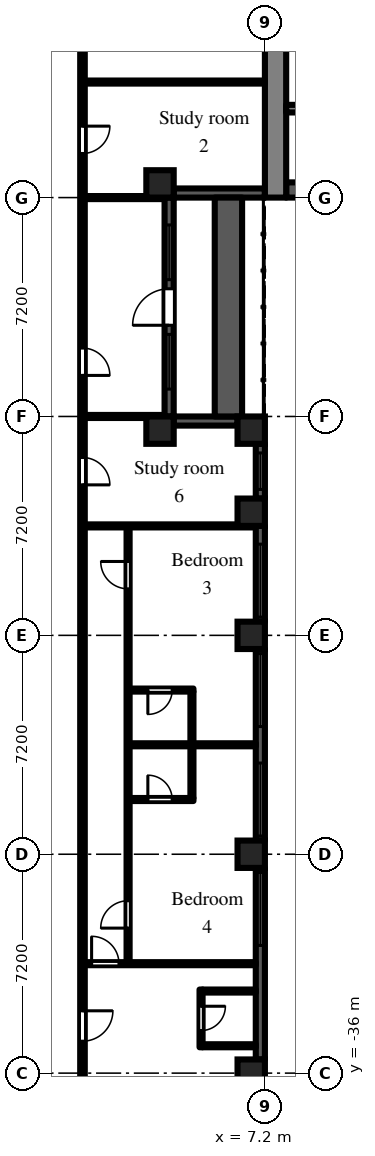
"""IFC4 building model, lengths in metres.
Left out: names, types, materials, properties, quantities, classifications, styles, units other than length and angle.
Written with IfcOpenShell. Run it as: python <this file> out.ifc"""

import sys

from ifc_helpers import new_model, si_unit, direction, frame, frame_2d, origin, origin_2d, place, context, subcontext, project, spatial, rectangle, extrude, element, fill, save


model = new_model("IFC4")
c1 = context("Model", 3, precision=1e-05, world=origin(), true_north=direction((0.0, 1.0)))
c2 = subcontext(c1, "Body", "Model", "MODEL_VIEW")
j1 = project(units=[si_unit("LENGTHUNIT", "METRE"), si_unit("PLANEANGLEUNIT", "RADIAN")], contexts=[c1])
p1 = place(None, origin())
s1 = spatial("IfcSite", under=j1, at=p1, CompositionType="ELEMENT")
p2 = place(p1, origin())
s2 = spatial("IfcBuilding", under=s1, at=p2, CompositionType="ELEMENT")
p3 = place(p2, frame((0.0, 0.0, 44.7)))
s3 = spatial("IfcBuildingStorey", under=s2, at=p3, CompositionType="ELEMENT", Elevation=44.7)
for number, where, z_axis, x_axis in (
    (1, (3.75, -14.85, 0.0), (0.0, 0.0, 1.0), (1.0, 0.0, 0.0)),
    (2, (3.75, -6.75, 0.0), (0.0, 0.0, 1.0), (1.0, 0.0, 0.0)),
    (3, (6.75, -36.0, 0.0), (0.0, 0.0, 1.0), (1.0, 0.0, 0.0)),
    (4, (6.75, -28.8, 0.0), (0.0, 0.0, 1.0), (1.0, 0.0, 0.0)),
    (5, (6.75, -21.6, 0.0), (0.0, 0.0, 1.0), (1.0, 0.0, 0.0)),
    (6, (6.75, -17.55, 0.0), (0.0, 0.0, 1.0), (1.0, 0.0, 0.0)),
    (7, (6.75, -14.85, 0.0), (0.0, 0.0, 1.0), (1.0, 0.0, 0.0)),
):
    element("IfcColumn", number, at=place(p3, frame(where, z_axis=z_axis, x_axis=x_axis)), inside=s3, PredefinedType="COLUMN", context=c2, shape_type="SweptSolid", body=[
        extrude(rectangle(XDim=0.9, YDim=0.9, at=origin_2d()), origin(), (0.0, 0.0, 1.0), 3.0),
    ])
p4 = place(p3, frame((7.05, -35.55, 0.0), z_axis=(0.0, 0.0, 1.0), x_axis=(0.0, 1.0, 0.0)))
e8 = element("IfcWall", 8, at=p4, inside=s3, PredefinedType="SOLIDWALL", context=c2, shape_type="SweptSolid", body=[
    extrude(rectangle(XDim=6.3, YDim=0.3, at=frame_2d((3.15, 0.0))), origin(), (0.0, 0.0, 1.0), 2.1),
])
p5 = place(p4, frame((3.75, 0.0, 0.2)))
e9 = element("IfcOpeningElement", 9, at=p5, cuts=e8, PredefinedType="OPENING", context=c2, shape_type="SweptSolid", body=[
    extrude(rectangle(XDim=2.4, YDim=1.85, at=frame_2d((1.2, 0.925))), frame((0.0, 0.16, 0.0), z_axis=(0.0, -1.0, 0.0), x_axis=(1.0, 0.0, 0.0)), (0.0, 0.0, 1.0), 0.32),
])
p6 = place(p3, frame((7.05, -28.35, 0.0), z_axis=(0.0, 0.0, 1.0), x_axis=(0.0, 1.0, 0.0)))
e10 = element("IfcWall", 10, at=p6, inside=s3, PredefinedType="SOLIDWALL", context=c2, shape_type="SweptSolid", body=[
    extrude(rectangle(XDim=6.3, YDim=0.3, at=frame_2d((3.15, 0.0))), origin(), (0.0, 0.0, 1.0), 2.1),
])
p7 = place(p6, frame((0.15, 0.0, 0.2)))
e11 = element("IfcOpeningElement", 11, at=p7, cuts=e10, PredefinedType="OPENING", context=c2, shape_type="SweptSolid", body=[
    extrude(rectangle(XDim=2.4, YDim=1.85, at=frame_2d((1.2, 0.925))), frame((0.0, 0.16, 0.0), z_axis=(0.0, -1.0, 0.0), x_axis=(1.0, 0.0, 0.0)), (0.0, 0.0, 1.0), 0.32),
])
p8 = place(p6, frame((3.75, 0.0, 0.2)))
e12 = element("IfcOpeningElement", 12, at=p8, cuts=e10, PredefinedType="OPENING", context=c2, shape_type="SweptSolid", body=[
    extrude(rectangle(XDim=2.4, YDim=1.85, at=frame_2d((1.2, 0.925))), frame((0.0, 0.16, 0.0), z_axis=(0.0, -1.0, 0.0), x_axis=(1.0, 0.0, 0.0)), (0.0, 0.0, 1.0), 0.32),
])
p9 = place(p3, frame((7.05, -21.15, 0.0), z_axis=(0.0, 0.0, 1.0), x_axis=(0.0, 1.0, 0.0)))
e13 = element("IfcWall", 13, at=p9, inside=s3, PredefinedType="SOLIDWALL", context=c2, shape_type="SweptSolid", body=[
    extrude(rectangle(XDim=3.15, YDim=0.3, at=frame_2d((1.575, 0.0))), origin(), (0.0, 0.0, 1.0), 2.1),
])
p10 = place(p9, frame((0.15, 0.0, 0.2)))
e14 = element("IfcOpeningElement", 14, at=p10, cuts=e13, PredefinedType="OPENING", context=c2, shape_type="SweptSolid", body=[
    extrude(rectangle(XDim=2.4, YDim=1.85, at=frame_2d((1.2, 0.925))), frame((0.0, 0.16, 0.0), z_axis=(0.0, -1.0, 0.0), x_axis=(1.0, 0.0, 0.0)), (0.0, 0.0, 1.0), 0.32),
])
p11 = place(p3, frame((7.05, -17.1, 0.0), z_axis=(0.0, 0.0, 1.0), x_axis=(0.0, 1.0, 0.0)))
e15 = element("IfcWall", 15, at=p11, inside=s3, PredefinedType="SOLIDWALL", context=c2, shape_type="SweptSolid", body=[
    extrude(rectangle(XDim=1.8, YDim=0.3, at=frame_2d((0.9, 0.0))), origin(), (0.0, 0.0, 1.0), 2.1),
])
p12 = place(p11, frame((0.3, 0.0, 0.2)))
e16 = element("IfcOpeningElement", 16, at=p12, cuts=e15, PredefinedType="OPENING", context=c2, shape_type="SweptSolid", body=[
    extrude(rectangle(XDim=1.2, YDim=1.85, at=frame_2d((0.6, 0.925))), frame((0.0, 0.16, 0.0), z_axis=(0.0, -1.0, 0.0), x_axis=(1.0, 0.0, 0.0)), (0.0, 0.0, 1.0), 0.32),
])
p13 = place(p3, frame((6.3, -14.55, 0.0), z_axis=(0.0, 0.0, 1.0), x_axis=(-1.0, 0.0, 0.0)))
e17 = element("IfcWall", 17, at=p13, inside=s3, PredefinedType="SOLIDWALL", context=c2, shape_type="SweptSolid", body=[
    extrude(rectangle(XDim=2.1, YDim=0.3, at=frame_2d((1.05, 0.0))), origin(), (0.0, 0.0, 1.0), 2.1),
])
p14 = place(p3, frame((4.05, -14.4, 0.0), z_axis=(0.0, 0.0, 1.0), x_axis=(0.0, 1.0, 0.0)))
e18 = element("IfcWall", 18, at=p14, inside=s3, PredefinedType="SOLIDWALL", context=c2, shape_type="SweptSolid", body=[
    extrude(rectangle(XDim=7.2, YDim=0.3, at=frame_2d((3.6, 0.0))), origin(), (0.0, 0.0, 1.0), 2.1),
])
p15 = place(p14, frame((3.0, 0.0, 0.0)))
e19 = element("IfcOpeningElement", 19, at=p15, cuts=e18, PredefinedType="OPENING", context=c2, shape_type="SweptSolid", body=[
    extrude(rectangle(XDim=1.2, YDim=2.05, at=frame_2d((0.6, 1.025))), frame((0.0, 0.16, 0.0), z_axis=(0.0, -1.0, 0.0), x_axis=(1.0, 0.0, 0.0)), (0.0, 0.0, 1.0), 0.32),
])
p16 = place(p14, frame((0.9, 0.0, 0.2)))
e20 = element("IfcOpeningElement", 20, at=p16, cuts=e18, PredefinedType="OPENING", context=c2, shape_type="SweptSolid", body=[
    extrude(rectangle(XDim=1.8, YDim=1.85, at=frame_2d((0.9, 0.925))), frame((0.0, 0.16, 0.0), z_axis=(0.0, -1.0, 0.0), x_axis=(1.0, 0.0, 0.0)), (0.0, 0.0, 1.0), 0.32),
])
p17 = place(p14, frame((4.5, 0.0, 0.2)))
e21 = element("IfcOpeningElement", 21, at=p17, cuts=e18, PredefinedType="OPENING", context=c2, shape_type="SweptSolid", body=[
    extrude(rectangle(XDim=1.8, YDim=1.85, at=frame_2d((0.9, 0.925))), frame((0.0, 0.16, 0.0), z_axis=(0.0, -1.0, 0.0), x_axis=(1.0, 0.0, 0.0)), (0.0, 0.0, 1.0), 0.32),
])
p18 = place(p3, frame((4.2, -7.05, 0.0), z_axis=(0.0, 0.0, 1.0), x_axis=(1.0, 0.0, 0.0)))
e22 = element("IfcWall", 22, at=p18, inside=s3, PredefinedType="SOLIDWALL", context=c2, shape_type="SweptSolid", body=[
    extrude(rectangle(XDim=3.0, YDim=0.3, at=frame_2d((1.5, 0.0))), origin(), (0.0, 0.0, 1.0), 2.1),
])
p19 = place(p3, frame((6.0, -14.4, 0.0), z_axis=(0.0, 0.0, 1.0), x_axis=(0.0, 1.0, 0.0)))
e23 = element("IfcWall", 23, at=p19, inside=s3, PredefinedType="PARAPET", context=c2, shape_type="SweptSolid", body=[
    extrude(rectangle(XDim=7.2, YDim=0.9, at=frame_2d((3.6, 0.0))), origin(), (0.0, 0.0, 1.0), 0.8),
])
p20 = place(p3, frame((7.55, -7.2, 0.0), z_axis=(0.0, 0.0, 1.0), x_axis=(0.0, 1.0, 0.0)))
e24 = element("IfcWall", 24, at=p20, inside=s3, PredefinedType="SHEAR", context=c2, shape_type="SweptSolid", body=[
    extrude(rectangle(XDim=14.4, YDim=0.7, at=frame_2d((7.2, 0.0))), origin(), (0.0, 0.0, 1.0), 2.575),
])
p21 = place(p20, frame((6.0, 0.0, 0.0)))
e25 = element("IfcOpeningElement", 25, at=p21, cuts=e24, PredefinedType="OPENING", context=c2, shape_type="SweptSolid", body=[
    extrude(rectangle(XDim=2.4, YDim=2.2, at=frame_2d((1.2, 1.1))), frame((0.0, 0.36, 0.0), z_axis=(0.0, -1.0, 0.0), x_axis=(1.0, 0.0, 0.0)), (0.0, 0.0, 1.0), 0.72),
])
p22 = place(p3, frame((7.9, -6.95, 0.0), z_axis=(0.0, 0.0, 1.0), x_axis=(1.0, 0.0, 0.0)))
e26 = element("IfcWall", 26, at=p22, inside=s3, PredefinedType="SHEAR", context=c2, shape_type="SweptSolid", body=[
    extrude(rectangle(XDim=12.95, YDim=0.5, at=frame_2d((6.475, 0.0))), origin(), (0.0, 0.0, 1.0), 2.575),
])
p23 = place(p3, frame((7.9, -4.275, 0.0), z_axis=(0.0, 0.0, 1.0), x_axis=(1.0, 0.0, 0.0)))
e27 = element("IfcWall", 27, at=p23, inside=s3, PredefinedType="SHEAR", context=c2, shape_type="SweptSolid", body=[
    extrude(rectangle(XDim=1.95, YDim=0.25, at=frame_2d((0.975, 0.0))), origin(), (0.0, 0.0, 1.0), 2.575),
])
p24 = place(p3, frame((1.2, -36.5, 0.0), z_axis=(0.0, 0.0, 1.0), x_axis=(0.0, 1.0, 0.0)))
e28 = element("IfcWall", 28, at=p24, inside=s3, PredefinedType="PARTITIONING", context=c2, shape_type="SweptSolid", body=[
    extrude(rectangle(XDim=35.375, YDim=0.15, at=frame_2d((17.688, 0.0))), origin(), (0.0, 0.0, 1.0), 2.575),
])
p25 = place(p24, frame((30.75, 0.0, 0.0)))
e29 = element("IfcOpeningElement", 29, at=p25, cuts=e28, PredefinedType="OPENING", context=c2, shape_type="SweptSolid", body=[
    extrude(rectangle(XDim=0.9, YDim=2.1, at=frame_2d((0.45, 1.05))), frame((0.0, 0.085, 0.0), z_axis=(0.0, -1.0, 0.0), x_axis=(1.0, 0.0, 0.0)), (0.0, 0.0, 1.0), 0.17),
])
p26 = place(p24, frame((23.45, 0.0, 0.0)))
e30 = element("IfcOpeningElement", 30, at=p26, cuts=e28, PredefinedType="OPENING", context=c2, shape_type="SweptSolid", body=[
    extrude(rectangle(XDim=0.9, YDim=2.1, at=frame_2d((0.45, 1.05))), frame((0.0, 0.085, 0.0), z_axis=(0.0, -1.0, 0.0), x_axis=(1.0, 0.0, 0.0)), (0.0, 0.0, 1.0), 0.17),
])
p27 = place(p24, frame((19.85, 0.0, 0.0)))
e31 = element("IfcOpeningElement", 31, at=p27, cuts=e28, PredefinedType="OPENING", context=c2, shape_type="SweptSolid", body=[
    extrude(rectangle(XDim=0.9, YDim=2.1, at=frame_2d((0.45, 1.05))), frame((0.0, 0.085, 0.0), z_axis=(0.0, -1.0, 0.0), x_axis=(1.0, 0.0, 0.0)), (0.0, 0.0, 1.0), 0.17),
])
p28 = place(p24, frame((1.55, 0.0, 0.0)))
e32 = element("IfcOpeningElement", 32, at=p28, cuts=e28, PredefinedType="OPENING", context=c2, shape_type="SweptSolid", body=[
    extrude(rectangle(XDim=1.0, YDim=2.1, at=frame_2d((0.5, 1.05))), frame((0.0, 0.085, 0.0), z_axis=(0.0, -1.0, 0.0), x_axis=(1.0, 0.0, 0.0)), (0.0, 0.0, 1.0), 0.17),
])
p29 = place(p3, frame((1.275, -32.4, 0.0), z_axis=(0.0, 0.0, 1.0), x_axis=(1.0, 0.0, 0.0)))
e33 = element("IfcWall", 33, at=p29, inside=s3, PredefinedType="PARTITIONING", context=c2, shape_type="SweptSolid", body=[
    extrude(rectangle(XDim=5.625, YDim=0.1, at=frame_2d((2.812, 0.0))), origin(), (0.0, 0.0, 1.0), 2.575),
])
p30 = place(p29, frame((0.225, 0.0, 0.0)))
e34 = element("IfcOpeningElement", 34, at=p30, cuts=e33, PredefinedType="OPENING", context=c2, shape_type="SweptSolid", body=[
    extrude(rectangle(XDim=0.9, YDim=2.1, at=frame_2d((0.45, 1.05))), frame((0.0, 0.06, 0.0), z_axis=(0.0, -1.0, 0.0), x_axis=(1.0, 0.0, 0.0)), (0.0, 0.0, 1.0), 0.12),
])
p31 = place(p3, frame((1.275, -18.0, 0.0), z_axis=(0.0, 0.0, 1.0), x_axis=(1.0, 0.0, 0.0)))
e35 = element("IfcWall", 35, at=p31, inside=s3, PredefinedType="PARTITIONING", context=c2, shape_type="SweptSolid", body=[
    extrude(rectangle(XDim=5.625, YDim=0.1, at=frame_2d((2.812, 0.0))), origin(), (0.0, 0.0, 1.0), 2.575),
])
for number, where, z_axis, x_axis in (
    (36, (1.275, -14.4, 0.0), (0.0, 0.0, 1.0), (1.0, 0.0, 0.0)),
    (37, (1.275, -7.2, 0.0), (0.0, 0.0, 1.0), (1.0, 0.0, 0.0)),
):
    element("IfcWall", number, at=place(p3, frame(where, z_axis=z_axis, x_axis=x_axis)), inside=s3, PredefinedType="PARTITIONING", context=c2, shape_type="SweptSolid", body=[
        extrude(rectangle(XDim=2.625, YDim=0.1, at=frame_2d((1.312, 0.0))), origin(), (0.0, 0.0, 1.0), 2.575),
    ])
p32 = place(p3, frame((1.275, -3.4, 0.0), z_axis=(0.0, 0.0, 1.0), x_axis=(1.0, 0.0, 0.0)))
e38 = element("IfcWall", 38, at=p32, inside=s3, PredefinedType="PARTITIONING", context=c2, shape_type="SweptSolid", body=[
    extrude(rectangle(XDim=5.925, YDim=0.1, at=frame_2d((2.962, 0.0))), origin(), (0.0, 0.0, 1.0), 2.575),
])
p33 = place(p3, frame((2.7, -32.35, 0.0), z_axis=(0.0, 0.0, 1.0), x_axis=(0.0, 1.0, 0.0)))
e39 = element("IfcWall", 39, at=p33, inside=s3, PredefinedType="PARTITIONING", context=c2, shape_type="SweptSolid", body=[
    extrude(rectangle(XDim=14.3, YDim=0.1, at=frame_2d((7.15, 0.0))), origin(), (0.0, 0.0, 1.0), 2.575),
])
p34 = place(p33, frame((1.12, 0.0, 0.0)))
e40 = element("IfcOpeningElement", 40, at=p34, cuts=e39, PredefinedType="OPENING", context=c2, shape_type="SweptSolid", body=[
    extrude(rectangle(XDim=0.9, YDim=2.1, at=frame_2d((0.45, 1.05))), frame((0.0, 0.06, 0.0), z_axis=(0.0, -1.0, 0.0), x_axis=(1.0, 0.0, 0.0)), (0.0, 0.0, 1.0), 0.12),
])
p35 = place(p33, frame((12.28, 0.0, 0.0)))
e41 = element("IfcOpeningElement", 41, at=p35, cuts=e39, PredefinedType="OPENING", context=c2, shape_type="SweptSolid", body=[
    extrude(rectangle(XDim=0.9, YDim=2.1, at=frame_2d((0.45, 1.05))), frame((0.0, 0.06, 0.0), z_axis=(0.0, -1.0, 0.0), x_axis=(1.0, 0.0, 0.0)), (0.0, 0.0, 1.0), 0.12),
])
p36 = place(p3, frame((2.75, -27.0, 0.0), z_axis=(0.0, 0.0, 1.0), x_axis=(1.0, 0.0, 0.0)))
e42 = element("IfcWall", 42, at=p36, inside=s3, PredefinedType="PARTITIONING", context=c2, shape_type="SweptSolid", body=[
    extrude(rectangle(XDim=2.1, YDim=0.1, at=frame_2d((1.05, 0.0))), origin(), (0.0, 0.0, 1.0), 2.575),
])
p37 = place(p36, frame((0.6, 0.0, 0.0)))
e43 = element("IfcOpeningElement", 43, at=p37, cuts=e42, PredefinedType="OPENING", context=c2, shape_type="SweptSolid", body=[
    extrude(rectangle(XDim=0.8, YDim=2.1, at=frame_2d((0.4, 1.05))), frame((0.0, 0.06, 0.0), z_axis=(0.0, -1.0, 0.0), x_axis=(1.0, 0.0, 0.0)), (0.0, 0.0, 1.0), 0.12),
])
p38 = place(p3, frame((2.75, -25.2, 0.0), z_axis=(0.0, 0.0, 1.0), x_axis=(1.0, 0.0, 0.0)))
e44 = element("IfcWall", 44, at=p38, inside=s3, PredefinedType="PARTITIONING", context=c2, shape_type="SweptSolid", body=[
    extrude(rectangle(XDim=4.15, YDim=0.1, at=frame_2d((2.075, 0.0))), origin(), (0.0, 0.0, 1.0), 2.575),
])
p39 = place(p3, frame((2.75, -23.4, 0.0), z_axis=(0.0, 0.0, 1.0), x_axis=(1.0, 0.0, 0.0)))
e45 = element("IfcWall", 45, at=p39, inside=s3, PredefinedType="PARTITIONING", context=c2, shape_type="SweptSolid", body=[
    extrude(rectangle(XDim=2.1, YDim=0.1, at=frame_2d((1.05, 0.0))), origin(), (0.0, 0.0, 1.0), 2.575),
])
p40 = place(p39, frame((0.6, 0.0, 0.0)))
e46 = element("IfcOpeningElement", 46, at=p40, cuts=e45, PredefinedType="OPENING", context=c2, shape_type="SweptSolid", body=[
    extrude(rectangle(XDim=0.8, YDim=2.1, at=frame_2d((0.4, 1.05))), frame((0.0, 0.06, 0.0), z_axis=(0.0, -1.0, 0.0), x_axis=(1.0, 0.0, 0.0)), (0.0, 0.0, 1.0), 0.12),
])
p41 = place(p3, frame((4.8, -26.95, 0.0), z_axis=(0.0, 0.0, 1.0), x_axis=(0.0, 1.0, 0.0)))
e47 = element("IfcWall", 47, at=p41, inside=s3, PredefinedType="PARTITIONING", context=c2, shape_type="SweptSolid", body=[
    extrude(rectangle(XDim=3.5, YDim=0.1, at=frame_2d((1.75, 0.0))), origin(), (0.0, 0.0, 1.0), 2.575),
])
p42 = place(p3, frame((5.1, -35.15, 0.0), z_axis=(0.0, 0.0, 1.0), x_axis=(0.0, 1.0, 0.0)))
e48 = element("IfcWall", 48, at=p42, inside=s3, PredefinedType="PARTITIONING", context=c2, shape_type="SweptSolid", body=[
    extrude(rectangle(XDim=1.9, YDim=0.1, at=frame_2d((0.95, 0.0))), origin(), (0.0, 0.0, 1.0), 2.575),
])
p43 = place(p42, frame((0.55, 0.0, 0.0)))
e49 = element("IfcOpeningElement", 49, at=p43, cuts=e48, PredefinedType="OPENING", context=c2, shape_type="SweptSolid", body=[
    extrude(rectangle(XDim=0.8, YDim=2.1, at=frame_2d((0.4, 1.05))), frame((0.0, 0.06, 0.0), z_axis=(0.0, -1.0, 0.0), x_axis=(1.0, 0.0, 0.0)), (0.0, 0.0, 1.0), 0.12),
])
for number, where, z_axis, x_axis in (
    (50, (5.15, -35.1, 0.0), (0.0, 0.0, 1.0), (1.0, 0.0, 0.0)),
    (51, (5.15, -33.3, 0.0), (0.0, 0.0, 1.0), (1.0, 0.0, 0.0)),
):
    element("IfcWall", number, at=place(p3, frame(where, z_axis=z_axis, x_axis=x_axis)), inside=s3, PredefinedType="PARTITIONING", context=c2, shape_type="SweptSolid", body=[
        extrude(rectangle(XDim=1.75, YDim=0.1, at=frame_2d((0.875, 0.0))), origin(), (0.0, 0.0, 1.0), 2.575),
    ])
p44 = place(p5, origin())
e52 = element("IfcWindow", 52, at=p44, inside=s3, PartitioningType="SINGLE_PANEL", PredefinedType="WINDOW", context=c2, shape_type="SweptSolid", body=[
    extrude(rectangle(XDim=2.4, YDim=1.85, at=frame_2d((1.2, 0.925))), frame((0.0, 0.03, 0.0), z_axis=(0.0, -1.0, 0.0), x_axis=(1.0, 0.0, 0.0)), (0.0, 0.0, 1.0), 0.06),
])
fill(e9, e52)
p45 = place(p7, origin())
e53 = element("IfcWindow", 53, at=p45, inside=s3, PartitioningType="SINGLE_PANEL", PredefinedType="WINDOW", context=c2, shape_type="SweptSolid", body=[
    extrude(rectangle(XDim=2.4, YDim=1.85, at=frame_2d((1.2, 0.925))), frame((0.0, 0.03, 0.0), z_axis=(0.0, -1.0, 0.0), x_axis=(1.0, 0.0, 0.0)), (0.0, 0.0, 1.0), 0.06),
])
fill(e11, e53)
p46 = place(p8, origin())
e54 = element("IfcWindow", 54, at=p46, inside=s3, PartitioningType="SINGLE_PANEL", PredefinedType="WINDOW", context=c2, shape_type="SweptSolid", body=[
    extrude(rectangle(XDim=2.4, YDim=1.85, at=frame_2d((1.2, 0.925))), frame((0.0, 0.03, 0.0), z_axis=(0.0, -1.0, 0.0), x_axis=(1.0, 0.0, 0.0)), (0.0, 0.0, 1.0), 0.06),
])
fill(e12, e54)
p47 = place(p10, origin())
e55 = element("IfcWindow", 55, at=p47, inside=s3, PartitioningType="SINGLE_PANEL", PredefinedType="WINDOW", context=c2, shape_type="SweptSolid", body=[
    extrude(rectangle(XDim=2.4, YDim=1.85, at=frame_2d((1.2, 0.925))), frame((0.0, 0.03, 0.0), z_axis=(0.0, -1.0, 0.0), x_axis=(1.0, 0.0, 0.0)), (0.0, 0.0, 1.0), 0.06),
])
fill(e14, e55)
p48 = place(p12, origin())
e56 = element("IfcWindow", 56, at=p48, inside=s3, PartitioningType="SINGLE_PANEL", PredefinedType="WINDOW", context=c2, shape_type="SweptSolid", body=[
    extrude(rectangle(XDim=1.2, YDim=1.85, at=frame_2d((0.6, 0.925))), frame((0.0, 0.03, 0.0), z_axis=(0.0, -1.0, 0.0), x_axis=(1.0, 0.0, 0.0)), (0.0, 0.0, 1.0), 0.06),
])
fill(e16, e56)
p49 = place(p15, origin())
e57 = element("IfcDoor", 57, at=p49, inside=s3, OperationType="SINGLE_SWING_LEFT", PredefinedType="DOOR", context=c2, shape_type="SweptSolid", body=[
    extrude(rectangle(XDim=1.2, YDim=2.05, at=frame_2d((0.6, 1.025))), frame((0.0, 0.025, 0.0), z_axis=(0.0, -1.0, 0.0), x_axis=(1.0, 0.0, 0.0)), (0.0, 0.0, 1.0), 0.05),
])
fill(e19, e57)
p50 = place(p16, origin())
e58 = element("IfcWindow", 58, at=p50, inside=s3, PartitioningType="SINGLE_PANEL", PredefinedType="WINDOW", context=c2, shape_type="SweptSolid", body=[
    extrude(rectangle(XDim=1.8, YDim=1.85, at=frame_2d((0.9, 0.925))), frame((0.0, 0.03, 0.0), z_axis=(0.0, -1.0, 0.0), x_axis=(1.0, 0.0, 0.0)), (0.0, 0.0, 1.0), 0.06),
])
fill(e20, e58)
p51 = place(p17, origin())
e59 = element("IfcWindow", 59, at=p51, inside=s3, PartitioningType="SINGLE_PANEL", PredefinedType="WINDOW", context=c2, shape_type="SweptSolid", body=[
    extrude(rectangle(XDim=1.8, YDim=1.85, at=frame_2d((0.9, 0.925))), frame((0.0, 0.03, 0.0), z_axis=(0.0, -1.0, 0.0), x_axis=(1.0, 0.0, 0.0)), (0.0, 0.0, 1.0), 0.06),
])
fill(e21, e59)
p52 = place(p25, frame((0.9, 0.0, 0.0), z_axis=(0.0, 0.0, 1.0), x_axis=(-1.0, 0.0, 0.0)))
e60 = element("IfcDoor", 60, at=p52, inside=s3, OperationType="SINGLE_SWING_LEFT", PredefinedType="DOOR", context=c2, shape_type="SweptSolid", body=[
    extrude(rectangle(XDim=0.9, YDim=2.1, at=frame_2d((0.45, 1.05))), frame((0.0, 0.025, 0.0), z_axis=(0.0, -1.0, 0.0), x_axis=(1.0, 0.0, 0.0)), (0.0, 0.0, 1.0), 0.05),
])
fill(e29, e60)
p53 = place(p26, frame((0.9, 0.0, 0.0), z_axis=(0.0, 0.0, 1.0), x_axis=(-1.0, 0.0, 0.0)))
e61 = element("IfcDoor", 61, at=p53, inside=s3, OperationType="SINGLE_SWING_RIGHT", PredefinedType="DOOR", context=c2, shape_type="SweptSolid", body=[
    extrude(rectangle(XDim=0.9, YDim=2.1, at=frame_2d((0.45, 1.05))), frame((0.0, 0.025, 0.0), z_axis=(0.0, -1.0, 0.0), x_axis=(1.0, 0.0, 0.0)), (0.0, 0.0, 1.0), 0.05),
])
fill(e30, e61)
p54 = place(p27, frame((0.9, 0.0, 0.0), z_axis=(0.0, 0.0, 1.0), x_axis=(-1.0, 0.0, 0.0)))
e62 = element("IfcDoor", 62, at=p54, inside=s3, OperationType="SINGLE_SWING_RIGHT", PredefinedType="DOOR", context=c2, shape_type="SweptSolid", body=[
    extrude(rectangle(XDim=0.9, YDim=2.1, at=frame_2d((0.45, 1.05))), frame((0.0, 0.025, 0.0), z_axis=(0.0, -1.0, 0.0), x_axis=(1.0, 0.0, 0.0)), (0.0, 0.0, 1.0), 0.05),
])
fill(e31, e62)
p55 = place(p43, frame((0.8, 0.0, 0.0), z_axis=(0.0, 0.0, 1.0), x_axis=(-1.0, 0.0, 0.0)))
e63 = element("IfcDoor", 63, at=p55, inside=s3, OperationType="SINGLE_SWING_LEFT", PredefinedType="DOOR", context=c2, shape_type="SweptSolid", body=[
    extrude(rectangle(XDim=0.8, YDim=2.1, at=frame_2d((0.4, 1.05))), frame((0.0, 0.025, 0.0), z_axis=(0.0, -1.0, 0.0), x_axis=(1.0, 0.0, 0.0)), (0.0, 0.0, 1.0), 0.05),
])
fill(e49, e63)
p56 = place(p28, frame((1.0, 0.0, 0.0), z_axis=(0.0, 0.0, 1.0), x_axis=(-1.0, 0.0, 0.0)))
e64 = element("IfcDoor", 64, at=p56, inside=s3, OperationType="SINGLE_SWING_LEFT", PredefinedType="DOOR", context=c2, shape_type="SweptSolid", body=[
    extrude(rectangle(XDim=1.0, YDim=2.1, at=frame_2d((0.5, 1.05))), frame((0.0, 0.025, 0.0), z_axis=(0.0, -1.0, 0.0), x_axis=(1.0, 0.0, 0.0)), (0.0, 0.0, 1.0), 0.05),
])
fill(e32, e64)
p57 = place(p30, origin())
e65 = element("IfcDoor", 65, at=p57, inside=s3, OperationType="SINGLE_SWING_LEFT", PredefinedType="DOOR", context=c2, shape_type="SweptSolid", body=[
    extrude(rectangle(XDim=0.9, YDim=2.1, at=frame_2d((0.45, 1.05))), frame((0.0, 0.025, 0.0), z_axis=(0.0, -1.0, 0.0), x_axis=(1.0, 0.0, 0.0)), (0.0, 0.0, 1.0), 0.05),
])
fill(e34, e65)
p58 = place(p34, origin())
e66 = element("IfcDoor", 66, at=p58, inside=s3, OperationType="SINGLE_SWING_LEFT", PredefinedType="DOOR", context=c2, shape_type="SweptSolid", body=[
    extrude(rectangle(XDim=0.9, YDim=2.1, at=frame_2d((0.45, 1.05))), frame((0.0, 0.025, 0.0), z_axis=(0.0, -1.0, 0.0), x_axis=(1.0, 0.0, 0.0)), (0.0, 0.0, 1.0), 0.05),
])
fill(e40, e66)
p59 = place(p35, origin())
e67 = element("IfcDoor", 67, at=p59, inside=s3, OperationType="SINGLE_SWING_RIGHT", PredefinedType="DOOR", context=c2, shape_type="SweptSolid", body=[
    extrude(rectangle(XDim=0.9, YDim=2.1, at=frame_2d((0.45, 1.05))), frame((0.0, 0.025, 0.0), z_axis=(0.0, -1.0, 0.0), x_axis=(1.0, 0.0, 0.0)), (0.0, 0.0, 1.0), 0.05),
])
fill(e41, e67)
p60 = place(p40, frame((0.8, 0.0, 0.0), z_axis=(0.0, 0.0, 1.0), x_axis=(-1.0, 0.0, 0.0)))
e68 = element("IfcDoor", 68, at=p60, inside=s3, OperationType="SINGLE_SWING_RIGHT", PredefinedType="DOOR", context=c2, shape_type="SweptSolid", body=[
    extrude(rectangle(XDim=0.8, YDim=2.1, at=frame_2d((0.4, 1.05))), frame((0.0, 0.025, 0.0), z_axis=(0.0, -1.0, 0.0), x_axis=(1.0, 0.0, 0.0)), (0.0, 0.0, 1.0), 0.05),
])
fill(e46, e68)
p61 = place(p37, origin())
e69 = element("IfcDoor", 69, at=p61, inside=s3, OperationType="SINGLE_SWING_LEFT", PredefinedType="DOOR", context=c2, shape_type="SweptSolid", body=[
    extrude(rectangle(XDim=0.8, YDim=2.1, at=frame_2d((0.4, 1.05))), frame((0.0, 0.025, 0.0), z_axis=(0.0, -1.0, 0.0), x_axis=(1.0, 0.0, 0.0)), (0.0, 0.0, 1.0), 0.05),
])
fill(e43, e69)
save(model, sys.argv[1])
